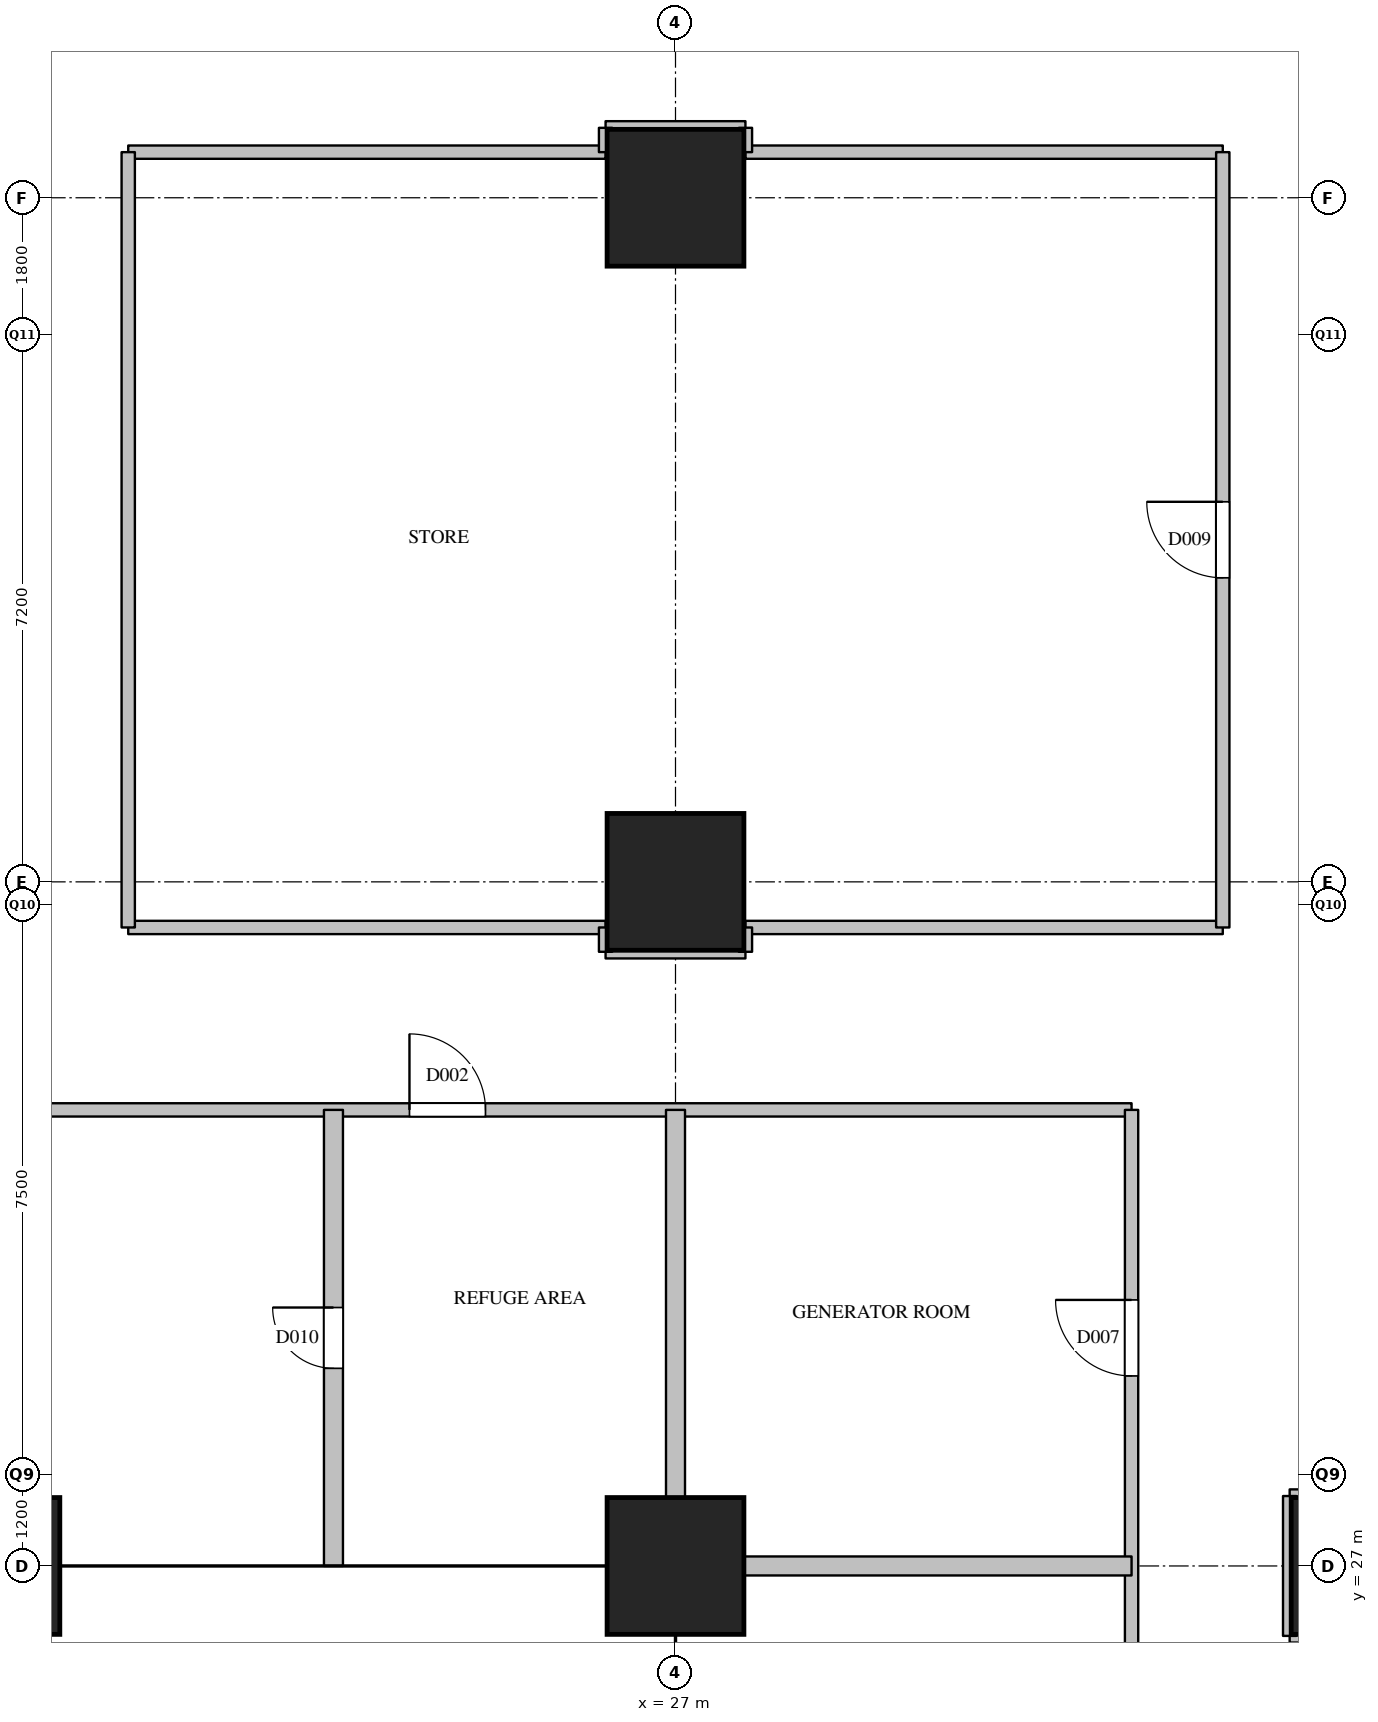
"""IFC4 building model, lengths in metres.
Left out: names, types, materials, properties, quantities, classifications, styles, units other than length and angle.
Written with IfcOpenShell. Run it as: python <this file> out.ifc"""

import sys

from ifc_helpers import new_model, si_unit, direction, frame, frame_2d, origin, origin_2d, place, context, subcontext, project, spatial, rectangle, extrude, element, fill, save


model = new_model("IFC4")
c1 = context("Model", 3, precision=1e-05, world=origin(), true_north=direction((0.0, 1.0)))
c2 = subcontext(c1, "Body", "Model", "MODEL_VIEW")
j1 = project(units=[si_unit("LENGTHUNIT", "METRE"), si_unit("PLANEANGLEUNIT", "RADIAN")], contexts=[c1])
p1 = place(None, origin())
s1 = spatial("IfcSite", under=j1, at=p1, CompositionType="ELEMENT")
p2 = place(p1, origin())
s2 = spatial("IfcBuilding", under=s1, at=p2, CompositionType="ELEMENT")
p3 = place(p2, frame((0.0, 0.0, 123.4)))
s3 = spatial("IfcBuildingStorey", under=s2, at=p3, CompositionType="ELEMENT", Elevation=123.4)
for number, where, z_axis, x_axis in (
    (1, (18.0, 27.0, 0.0), (0.0, 0.0, 1.0), (1.0, 0.0, 0.0)),
    (2, (27.0, 27.0, 0.0), (0.0, 0.0, 1.0), (1.0, 0.0, 0.0)),
    (3, (27.0, 36.0, 0.0), (0.0, 0.0, 1.0), (1.0, 0.0, 0.0)),
    (4, (27.0, 45.0, 0.0), (0.0, 0.0, 1.0), (1.0, 0.0, 0.0)),
    (5, (36.0, 27.0, 0.0), (0.0, 0.0, 1.0), (1.0, 0.0, 0.0)),
):
    element("IfcColumn", number, at=place(p3, frame(where, z_axis=z_axis, x_axis=x_axis)), inside=s3, PredefinedType="COLUMN", context=c2, shape_type="SweptSolid", body=[
        extrude(rectangle(XDim=1.8, YDim=1.8, at=origin_2d()), origin(), (0.0, 0.0, 1.0), 6.0),
    ])
p4 = place(p3, frame((35.08, 26.08, 0.0), z_axis=(0.0, 0.0, 1.0), x_axis=(1.0, 0.0, 0.0)))
e6 = element("IfcWall", 6, at=p4, inside=s3, PredefinedType="PARTITIONING", context=c2, shape_type="SweptSolid", body=[
    extrude(rectangle(XDim=0.32, YDim=0.175, at=frame_2d((0.16, 0.0))), origin(), (0.0, 0.0, 1.0), 5.7),
])
p5 = place(p3, frame((35.08, 27.92, 0.0), z_axis=(0.0, 0.0, 1.0), x_axis=(1.0, 0.0, 0.0)))
e7 = element("IfcWall", 7, at=p5, inside=s3, PredefinedType="PARTITIONING", context=c2, shape_type="SweptSolid", body=[
    extrude(rectangle(XDim=0.91, YDim=0.175, at=frame_2d((0.455, 0.0))), origin(), (0.0, 0.0, 1.0), 5.7),
])
p6 = place(p3, frame((18.0, 33.0, 0.0), z_axis=(0.0, 0.0, 1.0), x_axis=(1.0, 0.0, 0.0)))
e8 = element("IfcWall", 8, at=p6, inside=s3, PredefinedType="PARTITIONING", context=c2, shape_type="SweptSolid", body=[
    extrude(rectangle(XDim=15.0, YDim=0.175, at=frame_2d((7.5, 0.0))), origin(), (0.0, 0.0, 1.0), 5.7),
])
p7 = place(p6, frame((5.5, 0.0, 0.0)))
e9 = element("IfcOpeningElement", 9, at=p7, cuts=e8, PredefinedType="OPENING", context=c2, shape_type="SweptSolid", body=[
    extrude(rectangle(XDim=1.0, YDim=2.1, at=frame_2d((0.5, 1.05))), frame((0.0, 0.097, 0.0), z_axis=(0.0, -1.0, 0.0), x_axis=(1.0, 0.0, 0.0)), (0.0, 0.0, 1.0), 0.195),
])
p8 = place(p3, frame((26.08, 35.08, 0.0), z_axis=(0.0, 0.0, 1.0), x_axis=(1.0, 0.0, 0.0)))
e10 = element("IfcWall", 10, at=p8, inside=s3, PredefinedType="PARTITIONING", context=c2, shape_type="SweptSolid", body=[
    extrude(rectangle(XDim=1.84, YDim=0.175, at=frame_2d((0.92, 0.0))), origin(), (0.0, 0.0, 1.0), 5.7),
])
for number, where, z_axis, x_axis in (
    (11, (19.8, 35.4, 0.0), (0.0, 0.0, 1.0), (1.0, 0.0, 0.0)),
    (12, (27.92, 35.4, 0.0), (0.0, 0.0, 1.0), (1.0, 0.0, 0.0)),
    (13, (19.8, 45.6, 0.0), (0.0, 0.0, 1.0), (1.0, 0.0, 0.0)),
    (14, (27.92, 45.6, 0.0), (0.0, 0.0, 1.0), (1.0, 0.0, 0.0)),
):
    element("IfcWall", number, at=place(p3, frame(where, z_axis=z_axis, x_axis=x_axis)), inside=s3, PredefinedType="PARTITIONING", context=c2, shape_type="SweptSolid", body=[
        extrude(rectangle(XDim=6.28, YDim=0.175, at=frame_2d((3.14, 0.0))), origin(), (0.0, 0.0, 1.0), 5.7),
    ])
p9 = place(p3, frame((26.08, 45.92, 0.0), z_axis=(0.0, 0.0, 1.0), x_axis=(1.0, 0.0, 0.0)))
e15 = element("IfcWall", 15, at=p9, inside=s3, PredefinedType="PARTITIONING", context=c2, shape_type="SweptSolid", body=[
    extrude(rectangle(XDim=1.84, YDim=0.175, at=frame_2d((0.92, 0.0))), origin(), (0.0, 0.0, 1.0), 5.7),
])
p10 = place(p3, frame((19.8, 35.4, 0.0), z_axis=(0.0, 0.0, 1.0), x_axis=(0.0, 1.0, 0.0)))
e16 = element("IfcWall", 16, at=p10, inside=s3, PredefinedType="PARTITIONING", context=c2, shape_type="SweptSolid", body=[
    extrude(rectangle(XDim=10.2, YDim=0.175, at=frame_2d((5.1, 0.0))), origin(), (0.0, 0.0, 1.0), 5.7),
])
for number, where, z_axis, x_axis in (
    (17, (26.08, 35.08, 0.0), (0.0, 0.0, 1.0), (0.0, 1.0, 0.0)),
    (18, (26.08, 45.6, 0.0), (0.0, 0.0, 1.0), (0.0, 1.0, 0.0)),
    (19, (27.92, 35.08, 0.0), (0.0, 0.0, 1.0), (0.0, 1.0, 0.0)),
    (20, (27.92, 45.6, 0.0), (0.0, 0.0, 1.0), (0.0, 1.0, 0.0)),
):
    element("IfcWall", number, at=place(p3, frame(where, z_axis=z_axis, x_axis=x_axis)), inside=s3, PredefinedType="PARTITIONING", context=c2, shape_type="SweptSolid", body=[
        extrude(rectangle(XDim=0.32, YDim=0.175, at=frame_2d((0.16, 0.0))), origin(), (0.0, 0.0, 1.0), 5.7),
    ])
p11 = place(p3, frame((33.0, 6.0, 0.0), z_axis=(0.0, 0.0, 1.0), x_axis=(0.0, 1.0, 0.0)))
e21 = element("IfcWall", 21, at=p11, inside=s3, PredefinedType="PARTITIONING", context=c2, shape_type="SweptSolid", body=[
    extrude(rectangle(XDim=27.0, YDim=0.175, at=frame_2d((13.5, 0.0))), origin(), (0.0, 0.0, 1.0), 5.7),
])
p12 = place(p11, frame((10.0, 0.0, 0.0)))
e22 = element("IfcOpeningElement", 22, at=p12, cuts=e21, PredefinedType="OPENING", context=c2, shape_type="SweptSolid", body=[
    extrude(rectangle(XDim=1.0, YDim=2.1, at=frame_2d((0.5, 1.05))), frame((0.0, 0.097, 0.0), z_axis=(0.0, -1.0, 0.0), x_axis=(1.0, 0.0, 0.0)), (0.0, 0.0, 1.0), 0.195),
])
p13 = place(p11, frame((23.5, 0.0, 0.0)))
e23 = element("IfcOpeningElement", 23, at=p13, cuts=e21, PredefinedType="OPENING", context=c2, shape_type="SweptSolid", body=[
    extrude(rectangle(XDim=1.0, YDim=2.1, at=frame_2d((0.5, 1.05))), frame((0.0, 0.097, 0.0), z_axis=(0.0, -1.0, 0.0), x_axis=(1.0, 0.0, 0.0)), (0.0, 0.0, 1.0), 0.195),
])
p14 = place(p3, frame((34.2, 35.4, 0.0), z_axis=(0.0, 0.0, 1.0), x_axis=(0.0, 1.0, 0.0)))
e24 = element("IfcWall", 24, at=p14, inside=s3, PredefinedType="PARTITIONING", context=c2, shape_type="SweptSolid", body=[
    extrude(rectangle(XDim=10.2, YDim=0.175, at=frame_2d((5.1, 0.0))), origin(), (0.0, 0.0, 1.0), 5.7),
])
p15 = place(p14, frame((4.6, 0.0, 0.0)))
e25 = element("IfcOpeningElement", 25, at=p15, cuts=e24, PredefinedType="OPENING", context=c2, shape_type="SweptSolid", body=[
    extrude(rectangle(XDim=1.0, YDim=2.1, at=frame_2d((0.5, 1.05))), frame((0.0, 0.097, 0.0), z_axis=(0.0, -1.0, 0.0), x_axis=(1.0, 0.0, 0.0)), (0.0, 0.0, 1.0), 0.195),
])
p16 = place(p3, frame((35.08, 26.08, 0.0), z_axis=(0.0, 0.0, 1.0), x_axis=(0.0, 1.0, 0.0)))
e26 = element("IfcWall", 26, at=p16, inside=s3, PredefinedType="PARTITIONING", context=c2, shape_type="SweptSolid", body=[
    extrude(rectangle(XDim=1.84, YDim=0.175, at=frame_2d((0.92, 0.0))), origin(), (0.0, 0.0, 1.0), 5.7),
])
p17 = place(p3, frame((26.875, 27.0, 0.0), z_axis=(0.0, 0.0, 1.0), x_axis=(1.0, 0.0, 0.0)))
e27 = element("IfcWall", 27, at=p17, inside=s3, PredefinedType="PARTITIONING", context=c2, shape_type="SweptSolid", body=[
    extrude(rectangle(XDim=6.125, YDim=0.25, at=frame_2d((3.062, 0.0))), origin(), (0.0, 0.0, 1.0), 5.7),
])
p18 = place(p3, frame((22.5, 27.0, 0.0), z_axis=(0.0, 0.0, 1.0), x_axis=(0.0, 1.0, 0.0)))
e28 = element("IfcWall", 28, at=p18, inside=s3, PredefinedType="PARTITIONING", context=c2, shape_type="SweptSolid", body=[
    extrude(rectangle(XDim=6.0, YDim=0.25, at=frame_2d((3.0, 0.0))), origin(), (0.0, 0.0, 1.0), 5.7),
])
p19 = place(p18, frame((2.6, 0.0, 0.0)))
e29 = element("IfcOpeningElement", 29, at=p19, cuts=e28, PredefinedType="OPENING", context=c2, shape_type="SweptSolid", body=[
    extrude(rectangle(XDim=0.8, YDim=2.1, at=frame_2d((0.4, 1.05))), frame((0.0, 0.135, 0.0), z_axis=(0.0, -1.0, 0.0), x_axis=(1.0, 0.0, 0.0)), (0.0, 0.0, 1.0), 0.27),
])
p20 = place(p3, frame((27.0, 27.125, 0.0), z_axis=(0.0, 0.0, 1.0), x_axis=(0.0, 1.0, 0.0)))
e30 = element("IfcWall", 30, at=p20, inside=s3, PredefinedType="PARTITIONING", context=c2, shape_type="SweptSolid", body=[
    extrude(rectangle(XDim=5.875, YDim=0.25, at=frame_2d((2.938, 0.0))), origin(), (0.0, 0.0, 1.0), 5.7),
])
p21 = place(p7, origin())
e31 = element("IfcDoor", 31, at=p21, inside=s3, OperationType="SINGLE_SWING_LEFT", PredefinedType="DOOR", context=c2, shape_type="SweptSolid", body=[
    extrude(rectangle(XDim=1.0, YDim=2.1, at=frame_2d((0.5, 1.05))), frame((0.0, 0.025, 0.0), z_axis=(0.0, -1.0, 0.0), x_axis=(1.0, 0.0, 0.0)), (0.0, 0.0, 1.0), 0.05),
])
fill(e9, e31)
p22 = place(p13, origin())
e32 = element("IfcDoor", 32, at=p22, inside=s3, OperationType="SINGLE_SWING_RIGHT", PredefinedType="DOOR", context=c2, shape_type="SweptSolid", body=[
    extrude(rectangle(XDim=1.0, YDim=2.1, at=frame_2d((0.5, 1.05))), frame((0.0, 0.025, 0.0), z_axis=(0.0, -1.0, 0.0), x_axis=(1.0, 0.0, 0.0)), (0.0, 0.0, 1.0), 0.05),
])
fill(e23, e32)
p23 = place(p15, origin())
e33 = element("IfcDoor", 33, at=p23, inside=s3, OperationType="SINGLE_SWING_RIGHT", PredefinedType="DOOR", context=c2, shape_type="SweptSolid", body=[
    extrude(rectangle(XDim=1.0, YDim=2.1, at=frame_2d((0.5, 1.05))), frame((0.0, 0.025, 0.0), z_axis=(0.0, -1.0, 0.0), x_axis=(1.0, 0.0, 0.0)), (0.0, 0.0, 1.0), 0.05),
])
fill(e25, e33)
p24 = place(p19, origin())
e34 = element("IfcDoor", 34, at=p24, inside=s3, OperationType="SINGLE_SWING_RIGHT", PredefinedType="DOOR", context=c2, shape_type="SweptSolid", body=[
    extrude(rectangle(XDim=0.8, YDim=2.1, at=frame_2d((0.4, 1.05))), frame((0.0, 0.025, 0.0), z_axis=(0.0, -1.0, 0.0), x_axis=(1.0, 0.0, 0.0)), (0.0, 0.0, 1.0), 0.05),
])
fill(e29, e34)
save(model, sys.argv[1])
